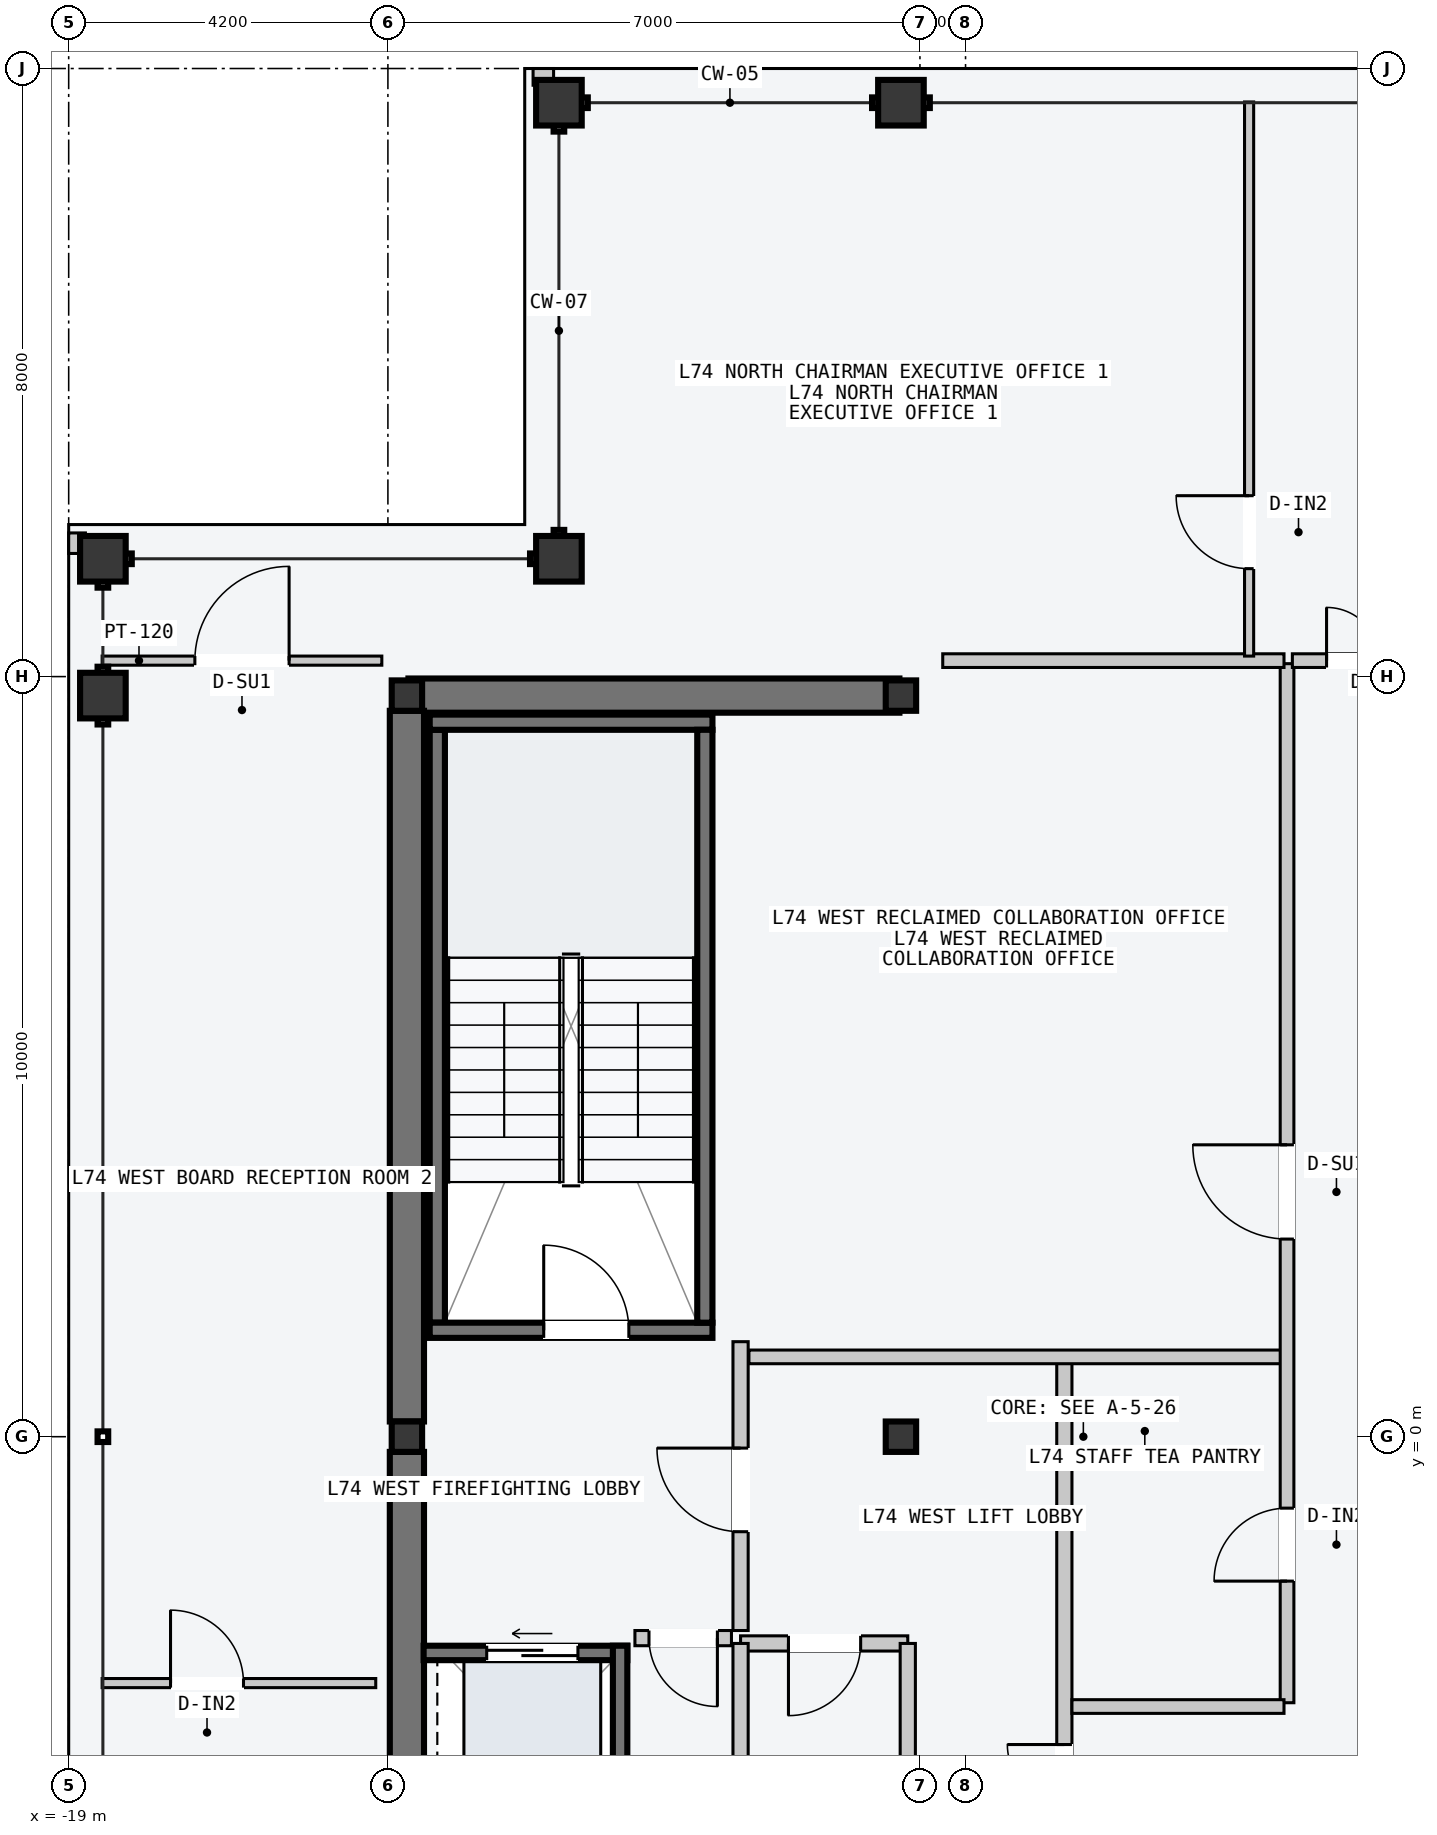
"""IFC4 building model, lengths in metres.
Left out: names, types, materials, properties, quantities, classifications, styles, units other than length and angle.
Written with IfcOpenShell. Run it as: python <this file> out.ifc"""

import sys

from ifc_helpers import new_model, si_unit, direction, frame, frame_2d, origin, origin_2d, place, context, subcontext, project, spatial, rectangle, hollow_rectangle, i_section, extrude, element, fill, save


model = new_model("IFC4")
c1 = context("Model", 3, precision=1e-05, world=origin(), true_north=direction((0.0, 1.0)))
c2 = subcontext(c1, "Body", "Model", "MODEL_VIEW")
j1 = project(units=[si_unit("LENGTHUNIT", "METRE"), si_unit("PLANEANGLEUNIT", "RADIAN")], contexts=[c1])
p1 = place(None, origin())
s1 = spatial("IfcSite", under=j1, at=p1, CompositionType="ELEMENT")
p2 = place(p1, origin())
s2 = spatial("IfcBuilding", under=s1, at=p2, CompositionType="ELEMENT")
p3 = place(p2, frame((0.0, 0.0, 280.8)))
s3 = spatial("IfcBuildingStorey", under=s2, at=p3, CompositionType="ELEMENT", Elevation=280.8)
p4 = place(p3, frame((-14.53, 9.75, -0.2), z_axis=(0.0, 0.0, 1.0), x_axis=(1.0, 0.0, 0.0)))
e1 = element("IfcWall", 1, at=p4, inside=s3, PredefinedType="SHEAR", context=c2, shape_type="SweptSolid", body=[
    extrude(rectangle(XDim=6.46, YDim=0.45, at=frame_2d((3.23, 0.0))), origin(), (0.0, 0.0, 1.0), 3.6),
])
for number, where, z_axis, x_axis in (
    (2, (-14.55, -9.55, -0.2), (0.0, 0.0, 1.0), (0.0, 1.0, 0.0)),
    (3, (-14.55, 0.2, -0.2), (0.0, 0.0, 1.0), (0.0, 1.0, 0.0)),
):
    element("IfcWall", number, at=place(p3, frame(where, z_axis=z_axis, x_axis=x_axis)), inside=s3, PredefinedType="SHEAR", context=c2, shape_type="SweptSolid", body=[
        extrude(rectangle(XDim=9.35, YDim=0.45, at=frame_2d((4.675, 0.0))), origin(), (0.0, 0.0, 1.0), 3.6),
    ])
p5 = place(p3, frame((-14.15, 1.5, -0.2), z_axis=(0.0, 0.0, 1.0), x_axis=(0.0, 1.0, 0.0)))
e4 = element("IfcWall", 4, at=p5, inside=s3, PredefinedType="SOLIDWALL", context=c2, shape_type="SweptSolid", body=[
    extrude(rectangle(XDim=7.8, YDim=0.2, at=frame_2d((3.9, 0.0))), origin(), (0.0, 0.0, 1.0), 3.6),
])
p6 = place(p3, frame((-14.25, 1.4, -0.2), z_axis=(0.0, 0.0, 1.0), x_axis=(1.0, 0.0, 0.0)))
e5 = element("IfcWall", 5, at=p6, inside=s3, PredefinedType="SOLIDWALL", context=c2, shape_type="SweptSolid", body=[
    extrude(rectangle(XDim=3.72, YDim=0.2, at=frame_2d((1.86, 0.0))), origin(), (0.0, 0.0, 1.0), 3.6),
])
p7 = place(p6, frame((1.5, 0.0, 0.2)))
e6 = element("IfcOpeningElement", 6, at=p7, cuts=e5, PredefinedType="OPENING", context=c2, shape_type="SweptSolid", body=[
    extrude(rectangle(XDim=1.12, YDim=2.18, at=frame_2d((0.56, 1.09))), frame((0.0, 0.11, 0.0), z_axis=(0.0, -1.0, 0.0), x_axis=(1.0, 0.0, 0.0)), (0.0, 0.0, 1.0), 0.22),
])
p8 = place(p3, frame((-14.25, 9.4, -0.2), z_axis=(0.0, 0.0, 1.0), x_axis=(1.0, 0.0, 0.0)))
e7 = element("IfcWall", 7, at=p8, inside=s3, PredefinedType="SOLIDWALL", context=c2, shape_type="SweptSolid", body=[
    extrude(rectangle(XDim=3.72, YDim=0.2, at=frame_2d((1.86, 0.0))), origin(), (0.0, 0.0, 1.0), 3.6),
])
p9 = place(p3, frame((-10.63, 1.5, -0.2), z_axis=(0.0, 0.0, 1.0), x_axis=(0.0, 1.0, 0.0)))
e8 = element("IfcWall", 8, at=p9, inside=s3, PredefinedType="SOLIDWALL", context=c2, shape_type="SweptSolid", body=[
    extrude(rectangle(XDim=7.8, YDim=0.2, at=frame_2d((3.9, 0.0))), origin(), (0.0, 0.0, 1.0), 3.6),
])
for number, where, z_axis, x_axis in (
    (9, (-14.55, 0.0, 0.0), (0.0, 0.0, 1.0), (1.0, 0.0, 0.0)),
    (10, (-14.55, 9.75, 0.0), (0.0, 0.0, 1.0), (1.0, 0.0, 0.0)),
    (11, (-8.05, 0.0, 0.0), (0.0, 0.0, 1.0), (1.0, 0.0, 0.0)),
    (12, (-8.05, 9.75, 0.0), (0.0, 0.0, 1.0), (1.0, 0.0, 0.0)),
):
    element("IfcColumn", number, at=place(p3, frame(where, z_axis=z_axis, x_axis=x_axis)), inside=s3, PredefinedType="COLUMN", context=c2, shape_type="SweptSolid", body=[
        extrude(i_section(OverallWidth=0.4, OverallDepth=0.4, WebThickness=0.013, FlangeThickness=0.021, at=origin_2d()), origin(), (0.0, 0.0, 1.0), 3.6),
    ])
for number, where, z_axis, x_axis in (
    (13, (-12.55, 17.55, 0.0), (0.0, 0.0, 1.0), (1.0, 0.0, 0.0)),
    (14, (-8.05, 17.55, 0.0), (0.0, 0.0, 1.0), (1.0, 0.0, 0.0)),
    (15, (-18.55, 9.75, 0.0), (0.0, 0.0, 1.0), (0.0, 1.0, 0.0)),
    (16, (-18.55, 11.55, 0.0), (0.0, 0.0, 1.0), (0.0, 1.0, 0.0)),
    (17, (-12.55, 11.55, 0.0), (0.0, 0.0, 1.0), (1.0, 0.0, 0.0)),
):
    element("IfcColumn", number, at=place(p3, frame(where, z_axis=z_axis, x_axis=x_axis)), inside=s3, PredefinedType="COLUMN", context=c2, shape_type="SweptSolid", body=[
        extrude(hollow_rectangle(XDim=0.6, YDim=0.6, WallThickness=0.025, at=origin_2d()), origin(), (0.0, 0.0, 1.0), 3.6),
    ])
for number, where, z_axis, x_axis in (
    (18, (-12.89, 17.89, 0.0), (0.0, 0.0, 1.0), (1.0, 0.0, 0.0)),
    (19, (-18.89, 11.62, 0.0), (0.0, 0.0, 1.0), (0.0, 1.0, 0.0)),
):
    element("IfcWall", number, at=place(p3, frame(where, z_axis=z_axis, x_axis=x_axis)), inside=s3, PredefinedType="PARAPET", context=c2, shape_type="SweptSolid", body=[
        extrude(rectangle(XDim=0.27, YDim=0.22, at=frame_2d((0.135, 0.0))), origin(), (0.0, 0.0, 1.0), 1.2),
    ])
p10 = place(p3, frame((-14.33, -2.845, -0.2), z_axis=(0.0, 0.0, 1.0), x_axis=(1.0, 0.0, 0.0)))
e20 = element("IfcWall", 20, at=p10, inside=s3, PredefinedType="SOLIDWALL", context=c2, shape_type="SweptSolid", body=[
    extrude(rectangle(XDim=2.68, YDim=0.19, at=frame_2d((1.34, 0.0))), origin(), (0.0, 0.0, 1.0), 3.6),
])
p11 = place(p10, frame((0.83, 0.0, 0.2)))
e21 = element("IfcOpeningElement", 21, at=p11, cuts=e20, PredefinedType="OPENING", context=c2, shape_type="SweptSolid", body=[
    extrude(rectangle(XDim=1.2, YDim=2.2, at=frame_2d((0.6, 1.1))), frame((0.0, 0.105, 0.0), z_axis=(0.0, -1.0, 0.0), x_axis=(1.0, 0.0, 0.0)), (0.0, 0.0, 1.0), 0.21),
])
p12 = place(p3, frame((-11.745, -5.35, -0.2), z_axis=(0.0, 0.0, 1.0), x_axis=(0.0, 1.0, 0.0)))
e22 = element("IfcWall", 22, at=p12, inside=s3, PredefinedType="SOLIDWALL", context=c2, shape_type="SweptSolid", body=[
    extrude(rectangle(XDim=2.6, YDim=0.19, at=frame_2d((1.3, 0.0))), origin(), (0.0, 0.0, 1.0), 3.6),
])
p13 = place(p3, frame((-5.9, -9.45, 0.0), z_axis=(0.0, 0.0, 1.0), x_axis=(0.0, 1.0, 0.0)))
e23 = element("IfcWall", 23, at=p13, inside=s3, PredefinedType="PARTITIONING", context=c2, shape_type="SweptSolid", body=[
    extrude(rectangle(XDim=10.5, YDim=0.2, at=frame_2d((5.25, 0.0))), origin(), (0.0, 0.0, 1.0), 3.4),
])
p14 = place(p13, frame((3.9, 0.0, 0.0)))
e24 = element("IfcOpeningElement", 24, at=p14, cuts=e23, PredefinedType="OPENING", context=c2, shape_type="SweptSolid", body=[
    extrude(rectangle(XDim=1.5, YDim=2.2, at=frame_2d((0.75, 1.1))), frame((0.0, 0.11, 0.0), z_axis=(0.0, -1.0, 0.0), x_axis=(1.0, 0.0, 0.0)), (0.0, 0.0, 1.0), 0.22),
])
p15 = place(p3, frame((-10.16, -2.55, 0.0), z_axis=(0.0, 0.0, 1.0), x_axis=(0.0, 1.0, 0.0)))
e25 = element("IfcWall", 25, at=p15, inside=s3, PredefinedType="PARTITIONING", context=c2, shape_type="SweptSolid", body=[
    extrude(rectangle(XDim=3.8, YDim=0.2, at=frame_2d((1.9, 0.0))), origin(), (0.0, 0.0, 1.0), 3.4),
])
p16 = place(p15, frame((1.3, 0.0, 0.0)))
e26 = element("IfcOpeningElement", 26, at=p16, cuts=e25, PredefinedType="OPENING", context=c2, shape_type="SweptSolid", body=[
    extrude(rectangle(XDim=1.1, YDim=2.15, at=frame_2d((0.55, 1.075))), frame((0.0, 0.11, 0.0), z_axis=(0.0, -1.0, 0.0), x_axis=(1.0, 0.0, 0.0)), (0.0, 0.0, 1.0), 0.22),
])
p17 = place(p3, frame((-10.28, -2.65, 0.0), z_axis=(0.0, 0.0, 1.0), x_axis=(-1.0, 0.0, 0.0)))
e27 = element("IfcWall", 27, at=p17, inside=s3, PredefinedType="PARTITIONING", context=c2, shape_type="SweptSolid", body=[
    extrude(rectangle(XDim=1.27, YDim=0.2, at=frame_2d((0.635, 0.0))), origin(), (0.0, 0.0, 1.0), 3.4),
])
p18 = place(p17, frame((0.185, 0.0, 0.0)))
e28 = element("IfcOpeningElement", 28, at=p18, cuts=e27, PredefinedType="OPENING", context=c2, shape_type="SweptSolid", body=[
    extrude(rectangle(XDim=0.9, YDim=2.15, at=frame_2d((0.45, 1.075))), frame((0.0, 0.11, 0.0), z_axis=(0.0, -1.0, 0.0), x_axis=(1.0, 0.0, 0.0)), (0.0, 0.0, 1.0), 0.22),
])
p19 = place(p3, frame((-7.96, -2.72, 0.0), z_axis=(0.0, 0.0, 1.0), x_axis=(-1.0, 0.0, 0.0)))
e29 = element("IfcWall", 29, at=p19, inside=s3, PredefinedType="PARTITIONING", context=c2, shape_type="SweptSolid", body=[
    extrude(rectangle(XDim=2.2, YDim=0.2, at=frame_2d((1.1, 0.0))), origin(), (0.0, 0.0, 1.0), 3.4),
])
p20 = place(p19, frame((0.62, 0.0, 0.0)))
e30 = element("IfcOpeningElement", 30, at=p20, cuts=e29, PredefinedType="OPENING", context=c2, shape_type="SweptSolid", body=[
    extrude(rectangle(XDim=0.95, YDim=2.1, at=frame_2d((0.475, 1.05))), frame((0.0, 0.11, 0.0), z_axis=(0.0, -1.0, 0.0), x_axis=(1.0, 0.0, 0.0)), (0.0, 0.0, 1.0), 0.22),
])
for number, where, z_axis, x_axis in (
    (31, (-7.96, -5.16, 0.0), (0.0, 0.0, 1.0), (0.0, 1.0, 0.0)),
    (32, (-10.16, -5.16, 0.0), (0.0, 0.0, 1.0), (0.0, 1.0, 0.0)),
):
    element("IfcWall", number, at=place(p3, frame(where, z_axis=z_axis, x_axis=x_axis)), inside=s3, PredefinedType="PARTITIONING", context=c2, shape_type="SweptSolid", body=[
        extrude(rectangle(XDim=2.44, YDim=0.2, at=frame_2d((1.22, 0.0))), origin(), (0.0, 0.0, 1.0), 3.4),
    ])
p21 = place(p3, frame((-10.05, 1.05, 0.0), z_axis=(0.0, 0.0, 1.0), x_axis=(1.0, 0.0, 0.0)))
e33 = element("IfcWall", 33, at=p21, inside=s3, PredefinedType="PARTITIONING", context=c2, shape_type="SweptSolid", body=[
    extrude(rectangle(XDim=7.04, YDim=0.18, at=frame_2d((3.52, 0.0))), origin(), (0.0, 0.0, 1.0), 3.4),
])
p22 = place(p3, frame((-2.97, -3.5, 0.0), z_axis=(0.0, 0.0, 1.0), x_axis=(0.0, 1.0, 0.0)))
e34 = element("IfcWall", 34, at=p22, inside=s3, PredefinedType="PARTITIONING", context=c2, shape_type="SweptSolid", body=[
    extrude(rectangle(XDim=13.67, YDim=0.18, at=frame_2d((6.835, 0.0))), origin(), (0.0, 0.0, 1.0), 3.4),
])
p23 = place(p22, frame((6.1, 0.0, 0.0)))
e35 = element("IfcOpeningElement", 35, at=p23, cuts=e34, PredefinedType="OPENING", context=c2, shape_type="SweptSolid", body=[
    extrude(rectangle(XDim=1.24, YDim=2.24, at=frame_2d((0.62, 1.12))), frame((0.0, 0.1, 0.0), z_axis=(0.0, -1.0, 0.0), x_axis=(1.0, 0.0, 0.0)), (0.0, 0.0, 1.0), 0.2),
])
p24 = place(p22, frame((1.6, 0.0, 0.0)))
e36 = element("IfcOpeningElement", 36, at=p24, cuts=e34, PredefinedType="OPENING", context=c2, shape_type="SweptSolid", body=[
    extrude(rectangle(XDim=0.96, YDim=2.18, at=frame_2d((0.48, 1.09))), frame((0.0, 0.1, 0.0), z_axis=(0.0, -1.0, 0.0), x_axis=(1.0, 0.0, 0.0)), (0.0, 0.0, 1.0), 0.2),
])
p25 = place(p3, frame((-7.5, 10.21, 0.0), z_axis=(0.0, 0.0, 1.0), x_axis=(1.0, 0.0, 0.0)))
e37 = element("IfcWall", 37, at=p25, inside=s3, PredefinedType="PARTITIONING", context=c2, shape_type="SweptSolid", body=[
    extrude(rectangle(XDim=4.49, YDim=0.18, at=frame_2d((2.245, 0.0))), origin(), (0.0, 0.0, 1.0), 3.4),
])
p26 = place(p3, frame((-5.8, -3.55, 0.0), z_axis=(0.0, 0.0, 1.0), x_axis=(1.0, 0.0, 0.0)))
e38 = element("IfcWall", 38, at=p26, inside=s3, PredefinedType="PARTITIONING", context=c2, shape_type="SweptSolid", body=[
    extrude(rectangle(XDim=2.79, YDim=0.18, at=frame_2d((1.395, 0.0))), origin(), (0.0, 0.0, 1.0), 3.4),
])
p27 = place(p3, frame((-3.469, 10.27, 0.0), z_axis=(0.0, 0.0, 1.0), x_axis=(0.0, 1.0, 0.0)))
e39 = element("IfcWall", 39, at=p27, inside=s3, PredefinedType="PARTITIONING", context=c2, shape_type="SweptSolid", body=[
    extrude(rectangle(XDim=7.29, YDim=0.12, at=frame_2d((3.645, 0.0))), origin(), (0.0, 0.0, 1.0), 3.4),
])
p28 = place(p27, frame((1.15, 0.0, 0.0)))
e40 = element("IfcOpeningElement", 40, at=p28, cuts=e39, PredefinedType="OPENING", context=c2, shape_type="SweptSolid", body=[
    extrude(rectangle(XDim=0.96, YDim=2.18, at=frame_2d((0.48, 1.09))), frame((0.0, 0.07, 0.0), z_axis=(0.0, -1.0, 0.0), x_axis=(1.0, 0.0, 0.0)), (0.0, 0.0, 1.0), 0.14),
])
p29 = place(p3, frame((-2.9, 10.21, 0.0), z_axis=(0.0, 0.0, 1.0), x_axis=(1.0, 0.0, 0.0)))
e41 = element("IfcWall", 41, at=p29, inside=s3, PredefinedType="PARTITIONING", context=c2, shape_type="SweptSolid", body=[
    extrude(rectangle(XDim=2.3, YDim=0.18, at=frame_2d((1.15, 0.0))), origin(), (0.0, 0.0, 1.0), 3.4),
])
p30 = place(p29, frame((0.45, 0.0, 0.0)))
e42 = element("IfcOpeningElement", 42, at=p30, cuts=e41, PredefinedType="OPENING", context=c2, shape_type="SweptSolid", body=[
    extrude(rectangle(XDim=1.4, YDim=2.2, at=frame_2d((0.7, 1.1))), frame((0.0, 0.1, 0.0), z_axis=(0.0, -1.0, 0.0), x_axis=(1.0, 0.0, 0.0)), (0.0, 0.0, 1.0), 0.2),
])
p31 = place(p3, frame((-18.56, 10.21, 0.0), z_axis=(0.0, 0.0, 1.0), x_axis=(1.0, 0.0, 0.0)))
e43 = element("IfcWall", 43, at=p31, inside=s3, PredefinedType="PARTITIONING", context=c2, shape_type="SweptSolid", body=[
    extrude(rectangle(XDim=3.68, YDim=0.12, at=frame_2d((1.84, 0.0))), origin(), (0.0, 0.0, 1.0), 3.4),
])
p32 = place(p31, frame((1.22, 0.0, 0.0)))
e44 = element("IfcOpeningElement", 44, at=p32, cuts=e43, PredefinedType="OPENING", context=c2, shape_type="SweptSolid", body=[
    extrude(rectangle(XDim=1.24, YDim=2.24, at=frame_2d((0.62, 1.12))), frame((0.0, 0.07, 0.0), z_axis=(0.0, -1.0, 0.0), x_axis=(1.0, 0.0, 0.0)), (0.0, 0.0, 1.0), 0.14),
])
p33 = place(p3, frame((-18.56, -3.242, 0.0), z_axis=(0.0, 0.0, 1.0), x_axis=(1.0, 0.0, 0.0)))
e45 = element("IfcWall", 45, at=p33, inside=s3, PredefinedType="PARTITIONING", context=c2, shape_type="SweptSolid", body=[
    extrude(rectangle(XDim=3.6, YDim=0.12, at=frame_2d((1.8, 0.0))), origin(), (0.0, 0.0, 1.0), 3.05),
])
p34 = place(p33, frame((0.9, 0.0, 0.0)))
e46 = element("IfcOpeningElement", 46, at=p34, cuts=e45, PredefinedType="OPENING", context=c2, shape_type="SweptSolid", body=[
    extrude(rectangle(XDim=0.96, YDim=2.18, at=frame_2d((0.48, 1.09))), frame((0.0, 0.07, 0.0), z_axis=(0.0, -1.0, 0.0), x_axis=(1.0, 0.0, 0.0)), (0.0, 0.0, 1.0), 0.14),
])
p35 = place(p7, origin())
e47 = element("IfcDoor", 47, at=p35, inside=s3, OperationType="SINGLE_SWING_LEFT", PredefinedType="DOOR", context=c2, shape_type="SweptSolid", body=[
    extrude(rectangle(XDim=1.12, YDim=2.18, at=frame_2d((0.56, 1.09))), frame((0.0, 0.025, 0.0), z_axis=(0.0, -1.0, 0.0), x_axis=(1.0, 0.0, 0.0)), (0.0, 0.0, 1.0), 0.05),
])
fill(e6, e47)
p36 = place(p11, origin())
e48 = element("IfcDoor", 48, at=p36, inside=s3, OperationType="SLIDING_TO_LEFT", PredefinedType="DOOR", context=c2, shape_type="SweptSolid", body=[
    extrude(rectangle(XDim=1.2, YDim=2.2, at=frame_2d((0.6, 1.1))), frame((0.0, 0.025, 0.0), z_axis=(0.0, -1.0, 0.0), x_axis=(1.0, 0.0, 0.0)), (0.0, 0.0, 1.0), 0.05),
])
fill(e21, e48)
p37 = place(p14, origin())
e49 = element("IfcDoor", 49, at=p37, inside=s3, OperationType="DOUBLE_DOOR_SINGLE_SWING", PredefinedType="DOOR", context=c2, shape_type="SweptSolid", body=[
    extrude(rectangle(XDim=1.5, YDim=2.2, at=frame_2d((0.75, 1.1))), frame((0.0, 0.025, 0.0), z_axis=(0.0, -1.0, 0.0), x_axis=(1.0, 0.0, 0.0)), (0.0, 0.0, 1.0), 0.05),
])
fill(e24, e49)
p38 = place(p16, origin())
e50 = element("IfcDoor", 50, at=p38, inside=s3, OperationType="SINGLE_SWING_RIGHT", PredefinedType="DOOR", context=c2, shape_type="SweptSolid", body=[
    extrude(rectangle(XDim=1.1, YDim=2.15, at=frame_2d((0.55, 1.075))), frame((0.0, 0.025, 0.0), z_axis=(0.0, -1.0, 0.0), x_axis=(1.0, 0.0, 0.0)), (0.0, 0.0, 1.0), 0.05),
])
fill(e26, e50)
p39 = place(p18, origin())
e51 = element("IfcDoor", 51, at=p39, inside=s3, OperationType="SINGLE_SWING_LEFT", PredefinedType="DOOR", context=c2, shape_type="SweptSolid", body=[
    extrude(rectangle(XDim=0.9, YDim=2.15, at=frame_2d((0.45, 1.075))), frame((0.0, 0.025, 0.0), z_axis=(0.0, -1.0, 0.0), x_axis=(1.0, 0.0, 0.0)), (0.0, 0.0, 1.0), 0.05),
])
fill(e28, e51)
p40 = place(p20, origin())
e52 = element("IfcDoor", 52, at=p40, inside=s3, OperationType="SINGLE_SWING_RIGHT", PredefinedType="DOOR", context=c2, shape_type="SweptSolid", body=[
    extrude(rectangle(XDim=0.95, YDim=2.1, at=frame_2d((0.475, 1.05))), frame((0.0, 0.025, 0.0), z_axis=(0.0, -1.0, 0.0), x_axis=(1.0, 0.0, 0.0)), (0.0, 0.0, 1.0), 0.05),
])
fill(e30, e52)
p41 = place(p23, origin())
e53 = element("IfcDoor", 53, at=p41, inside=s3, OperationType="SINGLE_SWING_RIGHT", PredefinedType="DOOR", context=c2, shape_type="SweptSolid", body=[
    extrude(rectangle(XDim=1.24, YDim=2.24, at=frame_2d((0.62, 1.12))), frame((0.0, 0.025, 0.0), z_axis=(0.0, -1.0, 0.0), x_axis=(1.0, 0.0, 0.0)), (0.0, 0.0, 1.0), 0.05),
])
fill(e35, e53)
p42 = place(p24, origin())
e54 = element("IfcDoor", 54, at=p42, inside=s3, OperationType="SINGLE_SWING_LEFT", PredefinedType="DOOR", context=c2, shape_type="SweptSolid", body=[
    extrude(rectangle(XDim=0.96, YDim=2.18, at=frame_2d((0.48, 1.09))), frame((0.0, 0.025, 0.0), z_axis=(0.0, -1.0, 0.0), x_axis=(1.0, 0.0, 0.0)), (0.0, 0.0, 1.0), 0.05),
])
fill(e36, e54)
p43 = place(p28, origin())
e55 = element("IfcDoor", 55, at=p43, inside=s3, OperationType="SINGLE_SWING_RIGHT", PredefinedType="DOOR", context=c2, shape_type="SweptSolid", body=[
    extrude(rectangle(XDim=0.96, YDim=2.18, at=frame_2d((0.48, 1.09))), frame((0.0, 0.025, 0.0), z_axis=(0.0, -1.0, 0.0), x_axis=(1.0, 0.0, 0.0)), (0.0, 0.0, 1.0), 0.05),
])
fill(e40, e55)
p44 = place(p30, origin())
e56 = element("IfcDoor", 56, at=p44, inside=s3, OperationType="DOUBLE_DOOR_SINGLE_SWING", PredefinedType="DOOR", context=c2, shape_type="SweptSolid", body=[
    extrude(rectangle(XDim=1.4, YDim=2.2, at=frame_2d((0.7, 1.1))), frame((0.0, 0.025, 0.0), z_axis=(0.0, -1.0, 0.0), x_axis=(1.0, 0.0, 0.0)), (0.0, 0.0, 1.0), 0.05),
])
fill(e42, e56)
p45 = place(p32, origin())
e57 = element("IfcDoor", 57, at=p45, inside=s3, OperationType="SINGLE_SWING_RIGHT", PredefinedType="DOOR", context=c2, shape_type="SweptSolid", body=[
    extrude(rectangle(XDim=1.24, YDim=2.24, at=frame_2d((0.62, 1.12))), frame((0.0, 0.025, 0.0), z_axis=(0.0, -1.0, 0.0), x_axis=(1.0, 0.0, 0.0)), (0.0, 0.0, 1.0), 0.05),
])
fill(e44, e57)
p46 = place(p34, origin())
e58 = element("IfcDoor", 58, at=p46, inside=s3, OperationType="SINGLE_SWING_LEFT", PredefinedType="DOOR", context=c2, shape_type="SweptSolid", body=[
    extrude(rectangle(XDim=0.96, YDim=2.18, at=frame_2d((0.48, 1.09))), frame((0.0, 0.025, 0.0), z_axis=(0.0, -1.0, 0.0), x_axis=(1.0, 0.0, 0.0)), (0.0, 0.0, 1.0), 0.05),
])
fill(e46, e58)
save(model, sys.argv[1])
